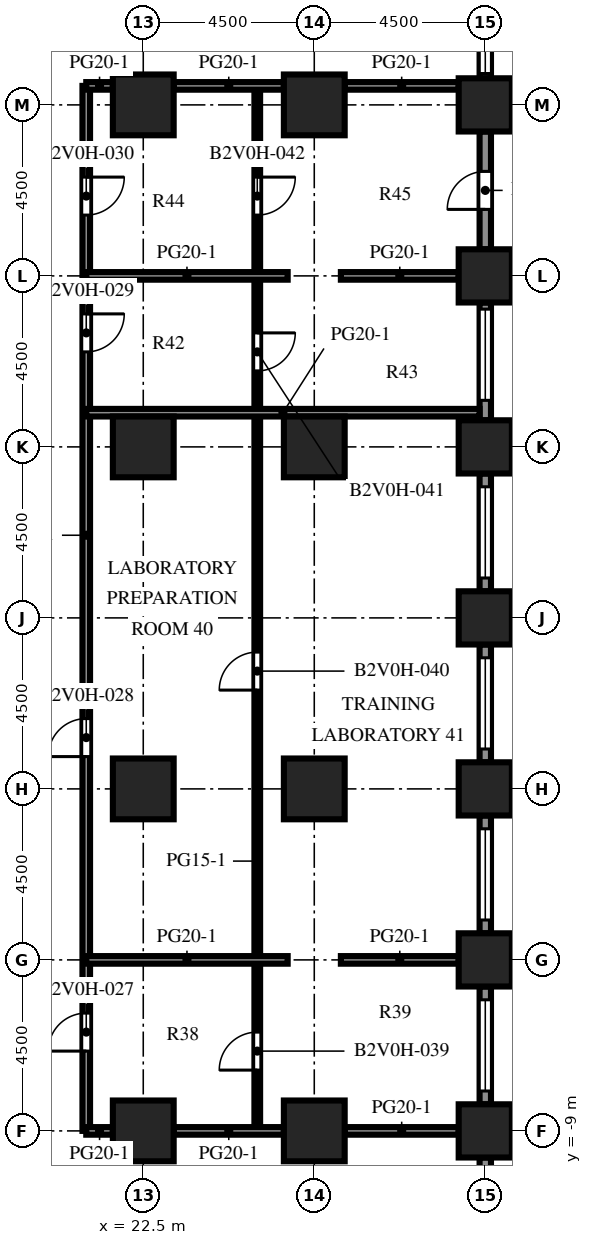
"""IFC4 building model, lengths in metres.
Left out: names, types, materials, properties, quantities, classifications, styles, units other than length and angle.
Written with IfcOpenShell. Run it as: python <this file> out.ifc"""

import sys

from ifc_helpers import new_model, si_unit, direction, frame, frame_2d, origin, origin_2d, place, context, subcontext, project, spatial, rectangle, extrude, element, fill, save


model = new_model("IFC4")
c1 = context("Model", 3, precision=1e-05, world=origin(), true_north=direction((0.0, 1.0)))
c2 = subcontext(c1, "Body", "Model", "MODEL_VIEW")
j1 = project(units=[si_unit("LENGTHUNIT", "METRE"), si_unit("PLANEANGLEUNIT", "RADIAN")], contexts=[c1])
p1 = place(None, origin())
s1 = spatial("IfcSite", under=j1, at=p1, CompositionType="ELEMENT")
p2 = place(p1, origin())
s2 = spatial("IfcBuilding", under=s1, at=p2, CompositionType="ELEMENT")
p3 = place(p2, frame((0.0, 0.0, 41.9)))
s3 = spatial("IfcBuildingStorey", under=s2, at=p3, CompositionType="ELEMENT", Elevation=41.9)
for number, where, z_axis, x_axis in (
    (1, (31.5, -9.0, -0.45), (0.0, 0.0, 1.0), (1.0, 0.0, 0.0)),
    (2, (31.5, -4.5, -0.45), (0.0, 0.0, 1.0), (1.0, 0.0, 0.0)),
    (3, (31.5, 0.0, -0.45), (0.0, 0.0, 1.0), (1.0, 0.0, 0.0)),
    (4, (31.5, 4.5, -0.45), (0.0, 0.0, 1.0), (1.0, 0.0, 0.0)),
    (5, (31.5, 9.0, -0.45), (0.0, 0.0, 1.0), (1.0, 0.0, 0.0)),
    (6, (31.5, 13.5, -0.45), (0.0, 0.0, 1.0), (1.0, 0.0, 0.0)),
    (7, (31.5, 18.0, -0.45), (0.0, 0.0, 1.0), (1.0, 0.0, 0.0)),
):
    element("IfcColumn", number, at=place(p3, frame(where, z_axis=z_axis, x_axis=x_axis)), inside=s3, PredefinedType="COLUMN", context=c2, shape_type="SweptSolid", body=[
        extrude(rectangle(XDim=1.4, YDim=1.4, at=origin_2d()), origin(), (0.0, 0.0, 1.0), 4.55),
    ])
for number, where, z_axis, x_axis in (
    (8, (22.5, -9.0, -0.45), (0.0, 0.0, 1.0), (1.0, 0.0, 0.0)),
    (9, (22.5, 0.0, -0.45), (0.0, 0.0, 1.0), (1.0, 0.0, 0.0)),
    (10, (22.5, 9.0, -0.45), (0.0, 0.0, 1.0), (1.0, 0.0, 0.0)),
    (11, (22.5, 18.0, -0.45), (0.0, 0.0, 1.0), (1.0, 0.0, 0.0)),
    (12, (27.0, -9.0, -0.45), (0.0, 0.0, 1.0), (1.0, 0.0, 0.0)),
    (13, (27.0, 0.0, -0.45), (0.0, 0.0, 1.0), (1.0, 0.0, 0.0)),
    (14, (27.0, 9.0, -0.45), (0.0, 0.0, 1.0), (1.0, 0.0, 0.0)),
    (15, (27.0, 18.0, -0.45), (0.0, 0.0, 1.0), (1.0, 0.0, 0.0)),
):
    element("IfcColumn", number, at=place(p3, frame(where, z_axis=z_axis, x_axis=x_axis)), inside=s3, PredefinedType="COLUMN", context=c2, shape_type="SweptSolid", body=[
        extrude(rectangle(XDim=1.6, YDim=1.6, at=origin_2d()), origin(), (0.0, 0.0, 1.0), 4.55),
    ])
p4 = place(p3, frame((31.5, -9.7, 0.0), z_axis=(0.0, 0.0, 1.0), x_axis=(0.0, -1.0, 0.0)))
e16 = element("IfcWall", 16, at=p4, inside=s3, PredefinedType="SOLIDWALL", context=c2, shape_type="SweptSolid", body=[
    extrude(rectangle(XDim=3.1, YDim=0.3, at=frame_2d((1.55, 0.0))), origin(), (0.0, 0.0, 1.0), 2.75),
])
p5 = place(p4, frame((0.475, 0.0, 0.8)))
e17 = element("IfcOpeningElement", 17, at=p5, cuts=e16, PredefinedType="OPENING", context=c2, shape_type="SweptSolid", body=[
    extrude(rectangle(XDim=1.2, YDim=1.7, at=frame_2d((0.6, 0.85))), frame((0.0, 0.16, 0.0), z_axis=(0.0, -1.0, 0.0), x_axis=(1.0, 0.0, 0.0)), (0.0, 0.0, 1.0), 0.32),
])
p6 = place(p3, frame((31.5, -5.2, 0.0), z_axis=(0.0, 0.0, 1.0), x_axis=(0.0, -1.0, 0.0)))
e18 = element("IfcWall", 18, at=p6, inside=s3, PredefinedType="SOLIDWALL", context=c2, shape_type="SweptSolid", body=[
    extrude(rectangle(XDim=3.1, YDim=0.3, at=frame_2d((1.55, 0.0))), origin(), (0.0, 0.0, 1.0), 2.75),
])
p7 = place(p6, frame((0.35, 0.0, 0.8)))
e19 = element("IfcOpeningElement", 19, at=p7, cuts=e18, PredefinedType="OPENING", context=c2, shape_type="SweptSolid", body=[
    extrude(rectangle(XDim=2.4, YDim=1.7, at=frame_2d((1.2, 0.85))), frame((0.0, 0.16, 0.0), z_axis=(0.0, -1.0, 0.0), x_axis=(1.0, 0.0, 0.0)), (0.0, 0.0, 1.0), 0.32),
])
p8 = place(p3, frame((31.5, -0.7, 0.0), z_axis=(0.0, 0.0, 1.0), x_axis=(0.0, -1.0, 0.0)))
e20 = element("IfcWall", 20, at=p8, inside=s3, PredefinedType="SOLIDWALL", context=c2, shape_type="SweptSolid", body=[
    extrude(rectangle(XDim=3.1, YDim=0.3, at=frame_2d((1.55, 0.0))), origin(), (0.0, 0.0, 1.0), 2.75),
])
p9 = place(p8, frame((0.35, 0.0, 0.8)))
e21 = element("IfcOpeningElement", 21, at=p9, cuts=e20, PredefinedType="OPENING", context=c2, shape_type="SweptSolid", body=[
    extrude(rectangle(XDim=2.4, YDim=1.7, at=frame_2d((1.2, 0.85))), frame((0.0, 0.16, 0.0), z_axis=(0.0, -1.0, 0.0), x_axis=(1.0, 0.0, 0.0)), (0.0, 0.0, 1.0), 0.32),
])
p10 = place(p3, frame((31.5, 3.8, 0.0), z_axis=(0.0, 0.0, 1.0), x_axis=(0.0, -1.0, 0.0)))
e22 = element("IfcWall", 22, at=p10, inside=s3, PredefinedType="SOLIDWALL", context=c2, shape_type="SweptSolid", body=[
    extrude(rectangle(XDim=3.1, YDim=0.3, at=frame_2d((1.55, 0.0))), origin(), (0.0, 0.0, 1.0), 2.75),
])
p11 = place(p10, frame((0.35, 0.0, 0.8)))
e23 = element("IfcOpeningElement", 23, at=p11, cuts=e22, PredefinedType="OPENING", context=c2, shape_type="SweptSolid", body=[
    extrude(rectangle(XDim=2.4, YDim=1.7, at=frame_2d((1.2, 0.85))), frame((0.0, 0.16, 0.0), z_axis=(0.0, -1.0, 0.0), x_axis=(1.0, 0.0, 0.0)), (0.0, 0.0, 1.0), 0.32),
])
p12 = place(p3, frame((31.5, 8.3, 0.0), z_axis=(0.0, 0.0, 1.0), x_axis=(0.0, -1.0, 0.0)))
e24 = element("IfcWall", 24, at=p12, inside=s3, PredefinedType="SOLIDWALL", context=c2, shape_type="SweptSolid", body=[
    extrude(rectangle(XDim=3.1, YDim=0.3, at=frame_2d((1.55, 0.0))), origin(), (0.0, 0.0, 1.0), 2.75),
])
p13 = place(p12, frame((0.35, 0.0, 0.8)))
e25 = element("IfcOpeningElement", 25, at=p13, cuts=e24, PredefinedType="OPENING", context=c2, shape_type="SweptSolid", body=[
    extrude(rectangle(XDim=2.4, YDim=1.7, at=frame_2d((1.2, 0.85))), frame((0.0, 0.16, 0.0), z_axis=(0.0, -1.0, 0.0), x_axis=(1.0, 0.0, 0.0)), (0.0, 0.0, 1.0), 0.32),
])
p14 = place(p3, frame((31.5, 12.8, 0.0), z_axis=(0.0, 0.0, 1.0), x_axis=(0.0, -1.0, 0.0)))
e26 = element("IfcWall", 26, at=p14, inside=s3, PredefinedType="SOLIDWALL", context=c2, shape_type="SweptSolid", body=[
    extrude(rectangle(XDim=3.1, YDim=0.3, at=frame_2d((1.55, 0.0))), origin(), (0.0, 0.0, 1.0), 2.75),
])
p15 = place(p14, frame((0.175, 0.0, 0.8)))
e27 = element("IfcOpeningElement", 27, at=p15, cuts=e26, PredefinedType="OPENING", context=c2, shape_type="SweptSolid", body=[
    extrude(rectangle(XDim=2.4, YDim=1.7, at=frame_2d((1.2, 0.85))), frame((0.0, 0.16, 0.0), z_axis=(0.0, -1.0, 0.0), x_axis=(1.0, 0.0, 0.0)), (0.0, 0.0, 1.0), 0.32),
])
p16 = place(p3, frame((31.5, 17.3, 0.0), z_axis=(0.0, 0.0, 1.0), x_axis=(0.0, -1.0, 0.0)))
e28 = element("IfcWall", 28, at=p16, inside=s3, PredefinedType="SOLIDWALL", context=c2, shape_type="SweptSolid", body=[
    extrude(rectangle(XDim=3.1, YDim=0.3, at=frame_2d((1.55, 0.0))), origin(), (0.0, 0.0, 1.0), 2.75),
])
p17 = place(p16, frame((1.05, 0.0, 0.0)))
e29 = element("IfcOpeningElement", 29, at=p17, cuts=e28, PredefinedType="OPENING", context=c2, shape_type="SweptSolid", body=[
    extrude(rectangle(XDim=1.0, YDim=2.2, at=frame_2d((0.5, 1.1))), frame((0.0, 0.16, 0.0), z_axis=(0.0, -1.0, 0.0), x_axis=(1.0, 0.0, 0.0)), (0.0, 0.0, 1.0), 0.32),
])
p18 = place(p3, frame((31.5, 21.8, 0.0), z_axis=(0.0, 0.0, 1.0), x_axis=(0.0, -1.0, 0.0)))
e30 = element("IfcWall", 30, at=p18, inside=s3, PredefinedType="SOLIDWALL", context=c2, shape_type="SweptSolid", body=[
    extrude(rectangle(XDim=3.1, YDim=0.3, at=frame_2d((1.55, 0.0))), origin(), (0.0, 0.0, 1.0), 2.75),
])
p19 = place(p18, frame((0.575, 0.0, 0.8)))
e31 = element("IfcOpeningElement", 31, at=p19, cuts=e30, PredefinedType="OPENING", context=c2, shape_type="SweptSolid", body=[
    extrude(rectangle(XDim=2.4, YDim=1.7, at=frame_2d((1.2, 0.85))), frame((0.0, 0.16, 0.0), z_axis=(0.0, -1.0, 0.0), x_axis=(1.0, 0.0, 0.0)), (0.0, 0.0, 1.0), 0.32),
])
p20 = place(p3, frame((21.0, 18.5, 0.0), z_axis=(0.0, 0.0, 1.0), x_axis=(0.0, -1.0, 0.0)))
e32 = element("IfcWall", 32, at=p20, inside=s3, PredefinedType="PARTITIONING", context=c2, shape_type="SweptSolid", body=[
    extrude(rectangle(XDim=27.5, YDim=0.2, at=frame_2d((13.75, 0.0))), origin(), (0.0, 0.0, 1.0), 3.65),
])
p21 = place(p20, frame((24.4, 0.0, 0.0)))
e33 = element("IfcOpeningElement", 33, at=p21, cuts=e32, PredefinedType="OPENING", context=c2, shape_type="SweptSolid", body=[
    extrude(rectangle(XDim=1.0, YDim=2.1, at=frame_2d((0.5, 1.05))), frame((0.0, 0.11, 0.0), z_axis=(0.0, -1.0, 0.0), x_axis=(1.0, 0.0, 0.0)), (0.0, 0.0, 1.0), 0.22),
])
p22 = place(p20, frame((16.65, 0.0, 0.0)))
e34 = element("IfcOpeningElement", 34, at=p22, cuts=e32, PredefinedType="OPENING", context=c2, shape_type="SweptSolid", body=[
    extrude(rectangle(XDim=1.0, YDim=2.1, at=frame_2d((0.5, 1.05))), frame((0.0, 0.11, 0.0), z_axis=(0.0, -1.0, 0.0), x_axis=(1.0, 0.0, 0.0)), (0.0, 0.0, 1.0), 0.22),
])
p23 = place(p20, frame((6.0, 0.0, 0.0)))
e35 = element("IfcOpeningElement", 35, at=p23, cuts=e32, PredefinedType="OPENING", context=c2, shape_type="SweptSolid", body=[
    extrude(rectangle(XDim=1.0, YDim=2.1, at=frame_2d((0.5, 1.05))), frame((0.0, 0.11, 0.0), z_axis=(0.0, -1.0, 0.0), x_axis=(1.0, 0.0, 0.0)), (0.0, 0.0, 1.0), 0.22),
])
p24 = place(p20, frame((2.4, 0.0, 0.0)))
e36 = element("IfcOpeningElement", 36, at=p24, cuts=e32, PredefinedType="OPENING", context=c2, shape_type="SweptSolid", body=[
    extrude(rectangle(XDim=1.0, YDim=2.1, at=frame_2d((0.5, 1.05))), frame((0.0, 0.11, 0.0), z_axis=(0.0, -1.0, 0.0), x_axis=(1.0, 0.0, 0.0)), (0.0, 0.0, 1.0), 0.22),
])
p25 = place(p3, frame((25.5, 18.5, 0.0), z_axis=(0.0, 0.0, 1.0), x_axis=(0.0, -1.0, 0.0)))
e37 = element("IfcWall", 37, at=p25, inside=s3, PredefinedType="PARTITIONING", context=c2, shape_type="SweptSolid", body=[
    extrude(rectangle(XDim=27.5, YDim=0.15, at=frame_2d((13.75, 0.0))), origin(), (0.0, 0.0, 1.0), 3.65),
])
p26 = place(p25, frame((24.9, 0.0, 0.0)))
e38 = element("IfcOpeningElement", 38, at=p26, cuts=e37, PredefinedType="OPENING", context=c2, shape_type="SweptSolid", body=[
    extrude(rectangle(XDim=1.0, YDim=2.1, at=frame_2d((0.5, 1.05))), frame((0.0, 0.085, 0.0), z_axis=(0.0, -1.0, 0.0), x_axis=(1.0, 0.0, 0.0)), (0.0, 0.0, 1.0), 0.17),
])
p27 = place(p25, frame((14.9, 0.0, 0.0)))
e39 = element("IfcOpeningElement", 39, at=p27, cuts=e37, PredefinedType="OPENING", context=c2, shape_type="SweptSolid", body=[
    extrude(rectangle(XDim=1.0, YDim=2.1, at=frame_2d((0.5, 1.05))), frame((0.0, 0.085, 0.0), z_axis=(0.0, -1.0, 0.0), x_axis=(1.0, 0.0, 0.0)), (0.0, 0.0, 1.0), 0.17),
])
p28 = place(p25, frame((6.5, 0.0, 0.0)))
e40 = element("IfcOpeningElement", 40, at=p28, cuts=e37, PredefinedType="OPENING", context=c2, shape_type="SweptSolid", body=[
    extrude(rectangle(XDim=1.0, YDim=2.1, at=frame_2d((0.5, 1.05))), frame((0.0, 0.085, 0.0), z_axis=(0.0, -1.0, 0.0), x_axis=(1.0, 0.0, 0.0)), (0.0, 0.0, 1.0), 0.17),
])
p29 = place(p25, frame((2.4, 0.0, 0.0)))
e41 = element("IfcOpeningElement", 41, at=p29, cuts=e37, PredefinedType="OPENING", context=c2, shape_type="SweptSolid", body=[
    extrude(rectangle(XDim=1.0, YDim=2.1, at=frame_2d((0.5, 1.05))), frame((0.0, 0.085, 0.0), z_axis=(0.0, -1.0, 0.0), x_axis=(1.0, 0.0, 0.0)), (0.0, 0.0, 1.0), 0.17),
])
p30 = place(p3, frame((21.0, -9.0, 0.0), z_axis=(0.0, 0.0, 1.0), x_axis=(1.0, 0.0, 0.0)))
e42 = element("IfcWall", 42, at=p30, inside=s3, PredefinedType="PARTITIONING", context=c2, shape_type="SweptSolid", body=[
    extrude(rectangle(XDim=0.7, YDim=0.2, at=frame_2d((0.35, 0.0))), origin(), (0.0, 0.0, 1.0), 3.65),
])
p31 = place(p3, frame((23.3, -9.0, 0.0), z_axis=(0.0, 0.0, 1.0), x_axis=(1.0, 0.0, 0.0)))
e43 = element("IfcWall", 43, at=p31, inside=s3, PredefinedType="PARTITIONING", context=c2, shape_type="SweptSolid", body=[
    extrude(rectangle(XDim=2.9, YDim=0.2, at=frame_2d((1.45, 0.0))), origin(), (0.0, 0.0, 1.0), 3.65),
])
p32 = place(p3, frame((27.8, -9.0, 0.0), z_axis=(0.0, 0.0, 1.0), x_axis=(1.0, 0.0, 0.0)))
e44 = element("IfcWall", 44, at=p32, inside=s3, PredefinedType="PARTITIONING", context=c2, shape_type="SweptSolid", body=[
    extrude(rectangle(XDim=3.0, YDim=0.2, at=frame_2d((1.5, 0.0))), origin(), (0.0, 0.0, 1.0), 3.65),
])
p33 = place(p3, frame((21.0, -4.5, 0.0), z_axis=(0.0, 0.0, 1.0), x_axis=(1.0, 0.0, 0.0)))
e45 = element("IfcWall", 45, at=p33, inside=s3, PredefinedType="PARTITIONING", context=c2, shape_type="SweptSolid", body=[
    extrude(rectangle(XDim=5.3, YDim=0.2, at=frame_2d((2.65, 0.0))), origin(), (0.0, 0.0, 1.0), 3.65),
])
p34 = place(p3, frame((27.7, -4.5, 0.0), z_axis=(0.0, 0.0, 1.0), x_axis=(1.0, 0.0, 0.0)))
e46 = element("IfcWall", 46, at=p34, inside=s3, PredefinedType="PARTITIONING", context=c2, shape_type="SweptSolid", body=[
    extrude(rectangle(XDim=3.1, YDim=0.2, at=frame_2d((1.55, 0.0))), origin(), (0.0, 0.0, 1.0), 3.65),
])
p35 = place(p3, frame((21.0, 9.9, 0.0), z_axis=(0.0, 0.0, 1.0), x_axis=(1.0, 0.0, 0.0)))
e47 = element("IfcWall", 47, at=p35, inside=s3, PredefinedType="PARTITIONING", context=c2, shape_type="SweptSolid", body=[
    extrude(rectangle(XDim=10.35, YDim=0.2, at=frame_2d((5.175, 0.0))), origin(), (0.0, 0.0, 1.0), 3.65),
])
p36 = place(p3, frame((21.0, 13.5, 0.0), z_axis=(0.0, 0.0, 1.0), x_axis=(1.0, 0.0, 0.0)))
e48 = element("IfcWall", 48, at=p36, inside=s3, PredefinedType="PARTITIONING", context=c2, shape_type="SweptSolid", body=[
    extrude(rectangle(XDim=5.3, YDim=0.2, at=frame_2d((2.65, 0.0))), origin(), (0.0, 0.0, 1.0), 3.65),
])
p37 = place(p3, frame((27.7, 13.5, 0.0), z_axis=(0.0, 0.0, 1.0), x_axis=(1.0, 0.0, 0.0)))
e49 = element("IfcWall", 49, at=p37, inside=s3, PredefinedType="PARTITIONING", context=c2, shape_type="SweptSolid", body=[
    extrude(rectangle(XDim=3.1, YDim=0.2, at=frame_2d((1.55, 0.0))), origin(), (0.0, 0.0, 1.0), 3.65),
])
p38 = place(p3, frame((21.0, 18.5, 0.0), z_axis=(0.0, 0.0, 1.0), x_axis=(1.0, 0.0, 0.0)))
e50 = element("IfcWall", 50, at=p38, inside=s3, PredefinedType="PARTITIONING", context=c2, shape_type="SweptSolid", body=[
    extrude(rectangle(XDim=0.7, YDim=0.2, at=frame_2d((0.35, 0.0))), origin(), (0.0, 0.0, 1.0), 3.65),
])
p39 = place(p3, frame((23.3, 18.5, 0.0), z_axis=(0.0, 0.0, 1.0), x_axis=(1.0, 0.0, 0.0)))
e51 = element("IfcWall", 51, at=p39, inside=s3, PredefinedType="PARTITIONING", context=c2, shape_type="SweptSolid", body=[
    extrude(rectangle(XDim=2.9, YDim=0.2, at=frame_2d((1.45, 0.0))), origin(), (0.0, 0.0, 1.0), 3.65),
])
p40 = place(p3, frame((27.8, 18.5, 0.0), z_axis=(0.0, 0.0, 1.0), x_axis=(1.0, 0.0, 0.0)))
e52 = element("IfcWall", 52, at=p40, inside=s3, PredefinedType="PARTITIONING", context=c2, shape_type="SweptSolid", body=[
    extrude(rectangle(XDim=3.0, YDim=0.2, at=frame_2d((1.5, 0.0))), origin(), (0.0, 0.0, 1.0), 3.65),
])
p41 = place(p7, origin())
e53 = element("IfcWindow", 53, at=p41, inside=s3, PartitioningType="SINGLE_PANEL", PredefinedType="WINDOW", context=c2, shape_type="SweptSolid", body=[
    extrude(rectangle(XDim=2.4, YDim=1.7, at=frame_2d((1.2, 0.85))), frame((0.0, 0.03, 0.0), z_axis=(0.0, -1.0, 0.0), x_axis=(1.0, 0.0, 0.0)), (0.0, 0.0, 1.0), 0.06),
])
fill(e19, e53)
p42 = place(p9, origin())
e54 = element("IfcWindow", 54, at=p42, inside=s3, PartitioningType="SINGLE_PANEL", PredefinedType="WINDOW", context=c2, shape_type="SweptSolid", body=[
    extrude(rectangle(XDim=2.4, YDim=1.7, at=frame_2d((1.2, 0.85))), frame((0.0, 0.03, 0.0), z_axis=(0.0, -1.0, 0.0), x_axis=(1.0, 0.0, 0.0)), (0.0, 0.0, 1.0), 0.06),
])
fill(e21, e54)
p43 = place(p11, origin())
e55 = element("IfcWindow", 55, at=p43, inside=s3, PartitioningType="SINGLE_PANEL", PredefinedType="WINDOW", context=c2, shape_type="SweptSolid", body=[
    extrude(rectangle(XDim=2.4, YDim=1.7, at=frame_2d((1.2, 0.85))), frame((0.0, 0.03, 0.0), z_axis=(0.0, -1.0, 0.0), x_axis=(1.0, 0.0, 0.0)), (0.0, 0.0, 1.0), 0.06),
])
fill(e23, e55)
p44 = place(p13, origin())
e56 = element("IfcWindow", 56, at=p44, inside=s3, PartitioningType="SINGLE_PANEL", PredefinedType="WINDOW", context=c2, shape_type="SweptSolid", body=[
    extrude(rectangle(XDim=2.4, YDim=1.7, at=frame_2d((1.2, 0.85))), frame((0.0, 0.03, 0.0), z_axis=(0.0, -1.0, 0.0), x_axis=(1.0, 0.0, 0.0)), (0.0, 0.0, 1.0), 0.06),
])
fill(e25, e56)
p45 = place(p15, origin())
e57 = element("IfcWindow", 57, at=p45, inside=s3, PartitioningType="SINGLE_PANEL", PredefinedType="WINDOW", context=c2, shape_type="SweptSolid", body=[
    extrude(rectangle(XDim=2.4, YDim=1.7, at=frame_2d((1.2, 0.85))), frame((0.0, 0.03, 0.0), z_axis=(0.0, -1.0, 0.0), x_axis=(1.0, 0.0, 0.0)), (0.0, 0.0, 1.0), 0.06),
])
fill(e27, e57)
p46 = place(p17, origin())
e58 = element("IfcDoor", 58, at=p46, inside=s3, OperationType="SINGLE_SWING_RIGHT", PredefinedType="DOOR", context=c2, shape_type="SweptSolid", body=[
    extrude(rectangle(XDim=1.0, YDim=2.2, at=frame_2d((0.5, 1.1))), frame((0.0, 0.025, 0.0), z_axis=(0.0, -1.0, 0.0), x_axis=(1.0, 0.0, 0.0)), (0.0, 0.0, 1.0), 0.05),
])
fill(e29, e58)
p47 = place(p19, origin())
e59 = element("IfcWindow", 59, at=p47, inside=s3, PartitioningType="SINGLE_PANEL", PredefinedType="WINDOW", context=c2, shape_type="SweptSolid", body=[
    extrude(rectangle(XDim=2.4, YDim=1.7, at=frame_2d((1.2, 0.85))), frame((0.0, 0.03, 0.0), z_axis=(0.0, -1.0, 0.0), x_axis=(1.0, 0.0, 0.0)), (0.0, 0.0, 1.0), 0.06),
])
fill(e31, e59)
p48 = place(p21, origin())
e60 = element("IfcDoor", 60, at=p48, inside=s3, OperationType="SINGLE_SWING_RIGHT", PredefinedType="DOOR", context=c2, shape_type="SweptSolid", body=[
    extrude(rectangle(XDim=1.0, YDim=2.1, at=frame_2d((0.5, 1.05))), frame((0.0, 0.025, 0.0), z_axis=(0.0, -1.0, 0.0), x_axis=(1.0, 0.0, 0.0)), (0.0, 0.0, 1.0), 0.05),
])
fill(e33, e60)
p49 = place(p22, origin())
e61 = element("IfcDoor", 61, at=p49, inside=s3, OperationType="SINGLE_SWING_RIGHT", PredefinedType="DOOR", context=c2, shape_type="SweptSolid", body=[
    extrude(rectangle(XDim=1.0, YDim=2.1, at=frame_2d((0.5, 1.05))), frame((0.0, 0.025, 0.0), z_axis=(0.0, -1.0, 0.0), x_axis=(1.0, 0.0, 0.0)), (0.0, 0.0, 1.0), 0.05),
])
fill(e34, e61)
p50 = place(p23, origin())
e62 = element("IfcDoor", 62, at=p50, inside=s3, OperationType="SINGLE_SWING_LEFT", PredefinedType="DOOR", context=c2, shape_type="SweptSolid", body=[
    extrude(rectangle(XDim=1.0, YDim=2.1, at=frame_2d((0.5, 1.05))), frame((0.0, 0.025, 0.0), z_axis=(0.0, -1.0, 0.0), x_axis=(1.0, 0.0, 0.0)), (0.0, 0.0, 1.0), 0.05),
])
fill(e35, e62)
p51 = place(p24, origin())
e63 = element("IfcDoor", 63, at=p51, inside=s3, OperationType="SINGLE_SWING_LEFT", PredefinedType="DOOR", context=c2, shape_type="SweptSolid", body=[
    extrude(rectangle(XDim=1.0, YDim=2.1, at=frame_2d((0.5, 1.05))), frame((0.0, 0.025, 0.0), z_axis=(0.0, -1.0, 0.0), x_axis=(1.0, 0.0, 0.0)), (0.0, 0.0, 1.0), 0.05),
])
fill(e36, e63)
p52 = place(p26, origin())
e64 = element("IfcDoor", 64, at=p52, inside=s3, OperationType="SINGLE_SWING_RIGHT", PredefinedType="DOOR", context=c2, shape_type="SweptSolid", body=[
    extrude(rectangle(XDim=1.0, YDim=2.1, at=frame_2d((0.5, 1.05))), frame((0.0, 0.025, 0.0), z_axis=(0.0, -1.0, 0.0), x_axis=(1.0, 0.0, 0.0)), (0.0, 0.0, 1.0), 0.05),
])
fill(e38, e64)
p53 = place(p27, origin())
e65 = element("IfcDoor", 65, at=p53, inside=s3, OperationType="SINGLE_SWING_RIGHT", PredefinedType="DOOR", context=c2, shape_type="SweptSolid", body=[
    extrude(rectangle(XDim=1.0, YDim=2.1, at=frame_2d((0.5, 1.05))), frame((0.0, 0.025, 0.0), z_axis=(0.0, -1.0, 0.0), x_axis=(1.0, 0.0, 0.0)), (0.0, 0.0, 1.0), 0.05),
])
fill(e39, e65)
p54 = place(p28, origin())
e66 = element("IfcDoor", 66, at=p54, inside=s3, OperationType="SINGLE_SWING_LEFT", PredefinedType="DOOR", context=c2, shape_type="SweptSolid", body=[
    extrude(rectangle(XDim=1.0, YDim=2.1, at=frame_2d((0.5, 1.05))), frame((0.0, 0.025, 0.0), z_axis=(0.0, -1.0, 0.0), x_axis=(1.0, 0.0, 0.0)), (0.0, 0.0, 1.0), 0.05),
])
fill(e40, e66)
p55 = place(p29, origin())
e67 = element("IfcDoor", 67, at=p55, inside=s3, OperationType="SINGLE_SWING_LEFT", PredefinedType="DOOR", context=c2, shape_type="SweptSolid", body=[
    extrude(rectangle(XDim=1.0, YDim=2.1, at=frame_2d((0.5, 1.05))), frame((0.0, 0.025, 0.0), z_axis=(0.0, -1.0, 0.0), x_axis=(1.0, 0.0, 0.0)), (0.0, 0.0, 1.0), 0.05),
])
fill(e41, e67)
save(model, sys.argv[1])
